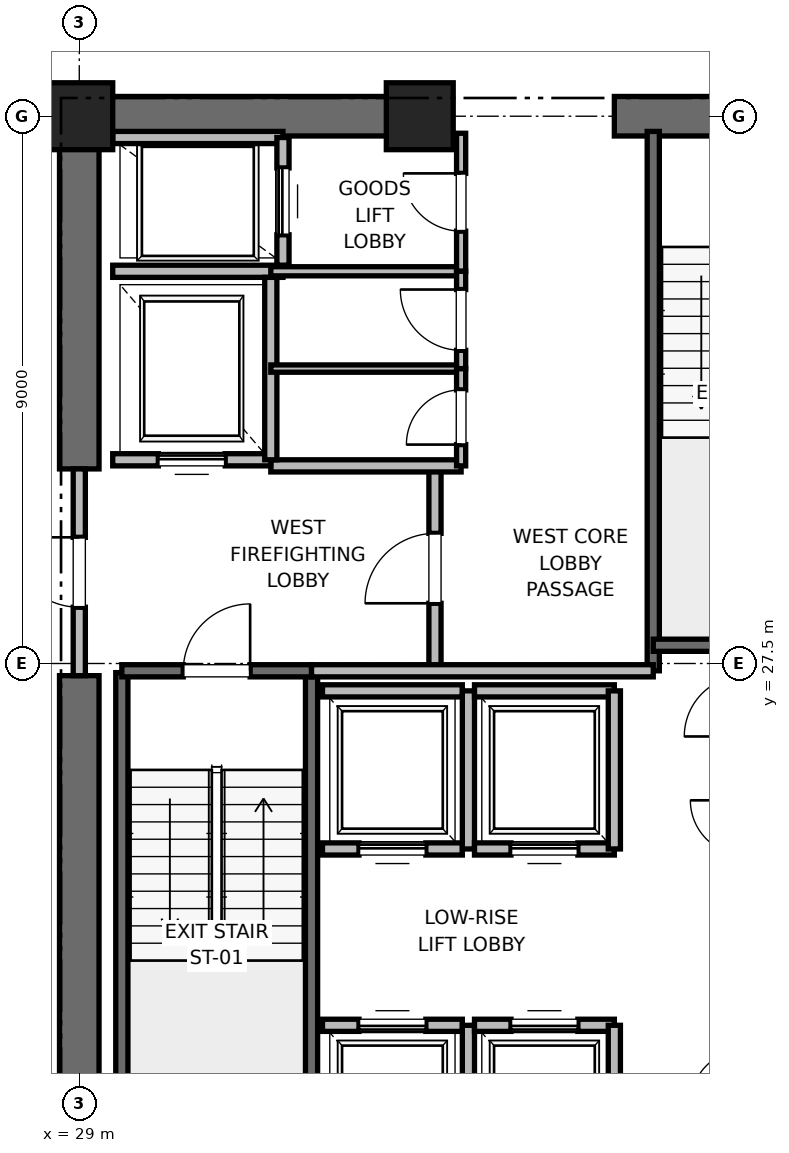
"""IFC4 building model, lengths in metres.
Left out: names, types, materials, properties, quantities, classifications, styles, units other than length and angle.
Written with IfcOpenShell. Run it as: python <this file> out.ifc"""

import sys

from ifc_helpers import new_model, si_unit, direction, frame, frame_2d, origin, origin_2d, place, context, subcontext, project, spatial, rectangle, extrude, element, fill, save


model = new_model("IFC4")
c1 = context("Model", 3, precision=1e-05, world=origin(), true_north=direction((0.0, 1.0)))
c2 = subcontext(c1, "Body", "Model", "MODEL_VIEW")
j1 = project(units=[si_unit("LENGTHUNIT", "METRE"), si_unit("PLANEANGLEUNIT", "RADIAN")], contexts=[c1])
p1 = place(None, origin())
s1 = spatial("IfcSite", under=j1, at=p1, CompositionType="ELEMENT")
p2 = place(p1, origin())
s2 = spatial("IfcBuilding", under=s1, at=p2, CompositionType="ELEMENT")
p3 = place(p2, frame((0.0, 0.0, 63.6)))
s3 = spatial("IfcBuildingStorey", under=s2, at=p3, CompositionType="ELEMENT", Elevation=63.6)
for number, where, z_axis, x_axis in (
    (1, (29.0, 36.5, 0.0), (0.0, 0.0, 1.0), (1.0, 0.0, 0.0)),
    (2, (34.6, 36.5, 0.0), (0.0, 0.0, 1.0), (1.0, 0.0, 0.0)),
):
    element("IfcColumn", number, at=place(p3, frame(where, z_axis=z_axis, x_axis=x_axis)), inside=s3, PredefinedType="PILASTER", context=c2, shape_type="SweptSolid", body=[
        extrude(rectangle(XDim=1.1, YDim=1.1, at=origin_2d()), origin(), (0.0, 0.0, 1.0), 4.0),
    ])
p4 = place(p3, frame((29.0, 36.5, 0.0), z_axis=(0.0, 0.0, 1.0), x_axis=(1.0, 0.0, 0.0)))
e3 = element("IfcWall", 3, at=p4, inside=s3, PredefinedType="SHEAR", context=c2, shape_type="SweptSolid", body=[
    extrude(rectangle(XDim=5.8, YDim=0.65, at=frame_2d((2.9, 0.0))), origin(), (0.0, 0.0, 1.0), 3.76),
])
p5 = place(p3, frame((37.8, 36.5, 0.0), z_axis=(0.0, 0.0, 1.0), x_axis=(1.0, 0.0, 0.0)))
e4 = element("IfcWall", 4, at=p5, inside=s3, PredefinedType="SHEAR", context=c2, shape_type="SweptSolid", body=[
    extrude(rectangle(XDim=4.4, YDim=0.65, at=frame_2d((2.2, 0.0))), origin(), (0.0, 0.0, 1.0), 3.76),
])
p6 = place(p5, frame((1.65, 0.0, 0.0)))
e5 = element("IfcOpeningElement", 5, at=p6, cuts=e4, PredefinedType="OPENING", context=c2, shape_type="SweptSolid", body=[
    extrude(rectangle(XDim=1.1, YDim=2.15, at=frame_2d((0.55, 1.075))), frame((0.0, 0.325, 0.0), z_axis=(0.0, -1.0, 0.0), x_axis=(1.0, 0.0, 0.0)), (0.0, 0.0, 1.0), 0.65),
])
p7 = place(p3, frame((29.0, 18.5, 0.0), z_axis=(0.0, 0.0, 1.0), x_axis=(0.0, 1.0, 0.0)))
e6 = element("IfcWall", 6, at=p7, inside=s3, PredefinedType="SHEAR", context=c2, shape_type="SweptSolid", body=[
    extrude(rectangle(XDim=8.8, YDim=0.65, at=frame_2d((4.4, 0.0))), origin(), (0.0, 0.0, 1.0), 3.76),
])
p8 = place(p3, frame((29.0, 30.7, 0.0), z_axis=(0.0, 0.0, 1.0), x_axis=(0.0, 1.0, 0.0)))
e7 = element("IfcWall", 7, at=p8, inside=s3, PredefinedType="SHEAR", context=c2, shape_type="SweptSolid", body=[
    extrude(rectangle(XDim=5.8, YDim=0.65, at=frame_2d((2.9, 0.0))), origin(), (0.0, 0.0, 1.0), 3.76),
])
p9 = place(p3, frame((29.7, 19.2, 0.0), z_axis=(0.0, 0.0, 1.0), x_axis=(0.0, 1.0, 0.0)))
e8 = element("IfcWall", 8, at=p9, inside=s3, PredefinedType="SOLIDWALL", context=c2, shape_type="SweptSolid", body=[
    extrude(rectangle(XDim=8.15, YDim=0.2, at=frame_2d((4.075, 0.0))), origin(), (0.0, 0.0, 1.0), 3.76),
])
p10 = place(p3, frame((32.82, 18.6, 0.0), z_axis=(0.0, 0.0, 1.0), x_axis=(0.0, 1.0, 0.0)))
e9 = element("IfcWall", 9, at=p10, inside=s3, PredefinedType="SOLIDWALL", context=c2, shape_type="SweptSolid", body=[
    extrude(rectangle(XDim=8.78, YDim=0.2, at=frame_2d((4.39, 0.0))), origin(), (0.0, 0.0, 1.0), 3.76),
])
p11 = place(p3, frame((29.7, 27.38, 0.0), z_axis=(0.0, 0.0, 1.0), x_axis=(1.0, 0.0, 0.0)))
e10 = element("IfcWall", 10, at=p11, inside=s3, PredefinedType="SOLIDWALL", context=c2, shape_type="SweptSolid", body=[
    extrude(rectangle(XDim=3.12, YDim=0.2, at=frame_2d((1.56, 0.0))), origin(), (0.0, 0.0, 1.0), 3.76),
])
p12 = place(p11, frame((1.01, 0.0, 0.0)))
e11 = element("IfcOpeningElement", 11, at=p12, cuts=e10, PredefinedType="OPENING", context=c2, shape_type="SweptSolid", body=[
    extrude(rectangle(XDim=1.1, YDim=2.15, at=frame_2d((0.55, 1.075))), frame((0.0, 0.1, 0.0), z_axis=(0.0, -1.0, 0.0), x_axis=(1.0, 0.0, 0.0)), (0.0, 0.0, 1.0), 0.2),
])
p13 = place(p3, frame((38.44, 27.38, 0.0), z_axis=(0.0, 0.0, 1.0), x_axis=(0.0, 1.0, 0.0)))
e12 = element("IfcWall", 12, at=p13, inside=s3, PredefinedType="SOLIDWALL", context=c2, shape_type="SweptSolid", body=[
    extrude(rectangle(XDim=8.87, YDim=0.2, at=frame_2d((4.435, 0.0))), origin(), (0.0, 0.0, 1.0), 3.76),
])
p14 = place(p3, frame((38.44, 27.8, 0.0), z_axis=(0.0, 0.0, 1.0), x_axis=(1.0, 0.0, 0.0)))
e13 = element("IfcWall", 13, at=p14, inside=s3, PredefinedType="SOLIDWALL", context=c2, shape_type="SweptSolid", body=[
    extrude(rectangle(XDim=3.32, YDim=0.2, at=frame_2d((1.66, 0.0))), origin(), (0.0, 0.0, 1.0), 3.76),
])
p15 = place(p3, frame((34.85, 27.38, 0.0), z_axis=(0.0, 0.0, 1.0), x_axis=(0.0, 1.0, 0.0)))
e14 = element("IfcWall", 14, at=p15, inside=s3, PredefinedType="PARTITIONING", context=c2, shape_type="SweptSolid", body=[
    extrude(rectangle(XDim=3.37, YDim=0.2, at=frame_2d((1.685, 0.0))), origin(), (0.0, 0.0, 1.0), 3.76),
])
p16 = place(p15, frame((1.11, 0.0, 0.0)))
e15 = element("IfcOpeningElement", 15, at=p16, cuts=e14, PredefinedType="OPENING", context=c2, shape_type="SweptSolid", body=[
    extrude(rectangle(XDim=1.15, YDim=2.2, at=frame_2d((0.575, 1.1))), frame((0.0, 0.1, 0.0), z_axis=(0.0, -1.0, 0.0), x_axis=(1.0, 0.0, 0.0)), (0.0, 0.0, 1.0), 0.2),
])
p17 = place(p3, frame((29.0, 27.3, 0.0), z_axis=(0.0, 0.0, 1.0), x_axis=(0.0, 1.0, 0.0)))
e16 = element("IfcWall", 16, at=p17, inside=s3, PredefinedType="PARTITIONING", context=c2, shape_type="SweptSolid", body=[
    extrude(rectangle(XDim=3.4, YDim=0.2, at=frame_2d((1.7, 0.0))), origin(), (0.0, 0.0, 1.0), 2.54),
])
p18 = place(p17, frame((1.125, 0.0, 0.0)))
e17 = element("IfcOpeningElement", 17, at=p18, cuts=e16, PredefinedType="OPENING", context=c2, shape_type="SweptSolid", body=[
    extrude(rectangle(XDim=1.15, YDim=2.2, at=frame_2d((0.575, 1.1))), frame((0.0, 0.1, 0.0), z_axis=(0.0, -1.0, 0.0), x_axis=(1.0, 0.0, 0.0)), (0.0, 0.0, 1.0), 0.2),
])
p19 = place(p3, frame((32.82, 27.38, 0.0), z_axis=(0.0, 0.0, 1.0), x_axis=(1.0, 0.0, 0.0)))
e18 = element("IfcWall", 18, at=p19, inside=s3, PredefinedType="PARTITIONING", context=c2, shape_type="SweptSolid", body=[
    extrude(rectangle(XDim=5.62, YDim=0.2, at=frame_2d((2.81, 0.0))), origin(), (0.0, 0.0, 1.0), 3.76),
])
p20 = place(p3, frame((32.15, 30.75, 0.0), z_axis=(0.0, 0.0, 1.0), x_axis=(1.0, 0.0, 0.0)))
e19 = element("IfcWall", 19, at=p20, inside=s3, PredefinedType="PARTITIONING", context=c2, shape_type="SweptSolid", body=[
    extrude(rectangle(XDim=3.13, YDim=0.2, at=frame_2d((1.565, 0.0))), origin(), (0.0, 0.0, 1.0), 3.76),
])
p21 = place(p3, frame((29.55, 30.85, 0.0), z_axis=(0.0, 0.0, 1.0), x_axis=(1.0, 0.0, 0.0)))
e20 = element("IfcWall", 20, at=p21, inside=s3, PredefinedType="SOLIDWALL", context=c2, shape_type="SweptSolid", body=[
    extrude(rectangle(XDim=2.6, YDim=0.2, at=frame_2d((1.3, 0.0))), origin(), (0.0, 0.0, 1.0), 2.54),
])
p22 = place(p21, frame((0.75, 0.0, 0.0)))
e21 = element("IfcOpeningElement", 21, at=p22, cuts=e20, PredefinedType="OPENING", context=c2, shape_type="SweptSolid", body=[
    extrude(rectangle(XDim=1.1, YDim=2.2, at=frame_2d((0.55, 1.1))), frame((0.0, 0.1, 0.0), z_axis=(0.0, -1.0, 0.0), x_axis=(1.0, 0.0, 0.0)), (0.0, 0.0, 1.0), 0.2),
])
p23 = place(p3, frame((29.55, 33.95, 0.0), z_axis=(0.0, 0.0, 1.0), x_axis=(1.0, 0.0, 0.0)))
e22 = element("IfcWall", 22, at=p23, inside=s3, PredefinedType="SOLIDWALL", context=c2, shape_type="SweptSolid", body=[
    extrude(rectangle(XDim=2.8, YDim=0.2, at=frame_2d((1.4, 0.0))), origin(), (0.0, 0.0, 1.0), 3.76),
])
p24 = place(p3, frame((32.15, 30.85, 0.0), z_axis=(0.0, 0.0, 1.0), x_axis=(0.0, 1.0, 0.0)))
e23 = element("IfcWall", 23, at=p24, inside=s3, PredefinedType="SOLIDWALL", context=c2, shape_type="SweptSolid", body=[
    extrude(rectangle(XDim=3.0, YDim=0.2, at=frame_2d((1.5, 0.0))), origin(), (0.0, 0.0, 1.0), 3.76),
])
p25 = place(p3, frame((32.35, 36.15, 0.0), z_axis=(0.0, 0.0, 1.0), x_axis=(-1.0, 0.0, 0.0)))
e24 = element("IfcWall", 24, at=p25, inside=s3, PredefinedType="SOLIDWALL", context=c2, shape_type="SweptSolid", body=[
    extrude(rectangle(XDim=2.8, YDim=0.2, at=frame_2d((1.4, 0.0))), origin(), (0.0, 0.0, 1.0), 2.889),
])
p26 = place(p3, frame((32.35, 34.05, 0.0), z_axis=(0.0, 0.0, 1.0), x_axis=(0.0, 1.0, 0.0)))
e25 = element("IfcWall", 25, at=p26, inside=s3, PredefinedType="SOLIDWALL", context=c2, shape_type="SweptSolid", body=[
    extrude(rectangle(XDim=2.1, YDim=0.2, at=frame_2d((1.05, 0.0))), origin(), (0.0, 0.0, 1.0), 3.76),
])
p27 = place(p26, frame((0.5, 0.0, 0.0)))
e26 = element("IfcOpeningElement", 26, at=p27, cuts=e25, PredefinedType="OPENING", context=c2, shape_type="SweptSolid", body=[
    extrude(rectangle(XDim=1.1, YDim=2.2, at=frame_2d((0.55, 1.1))), frame((0.0, 0.1, 0.0), z_axis=(0.0, -1.0, 0.0), x_axis=(1.0, 0.0, 0.0)), (0.0, 0.0, 1.0), 0.2),
])
p28 = place(p3, frame((35.3, 21.55, 0.0), z_axis=(0.0, 0.0, 1.0), x_axis=(-1.0, 0.0, 0.0)))
e27 = element("IfcWall", 27, at=p28, inside=s3, PredefinedType="SOLIDWALL", context=c2, shape_type="SweptSolid", body=[
    extrude(rectangle(XDim=2.3, YDim=0.2, at=frame_2d((1.15, 0.0))), origin(), (0.0, 0.0, 1.0), 3.76),
])
p29 = place(p28, frame((0.6, 0.0, 0.0)))
e28 = element("IfcOpeningElement", 28, at=p29, cuts=e27, PredefinedType="OPENING", context=c2, shape_type="SweptSolid", body=[
    extrude(rectangle(XDim=1.1, YDim=2.2, at=frame_2d((0.55, 1.1))), frame((0.0, 0.1, 0.0), z_axis=(0.0, -1.0, 0.0), x_axis=(1.0, 0.0, 0.0)), (0.0, 0.0, 1.0), 0.2),
])
p30 = place(p3, frame((35.4, 18.95, 0.0), z_axis=(0.0, 0.0, 1.0), x_axis=(0.0, 1.0, 0.0)))
e29 = element("IfcWall", 29, at=p30, inside=s3, PredefinedType="SOLIDWALL", context=c2, shape_type="SweptSolid", body=[
    extrude(rectangle(XDim=2.6, YDim=0.2, at=frame_2d((1.3, 0.0))), origin(), (0.0, 0.0, 1.0), 3.76),
])
p31 = place(p3, frame((37.8, 21.55, 0.0), z_axis=(0.0, 0.0, 1.0), x_axis=(-1.0, 0.0, 0.0)))
e30 = element("IfcWall", 30, at=p31, inside=s3, PredefinedType="SOLIDWALL", context=c2, shape_type="SweptSolid", body=[
    extrude(rectangle(XDim=2.3, YDim=0.2, at=frame_2d((1.15, 0.0))), origin(), (0.0, 0.0, 1.0), 3.76),
])
p32 = place(p31, frame((0.6, 0.0, 0.0)))
e31 = element("IfcOpeningElement", 31, at=p32, cuts=e30, PredefinedType="OPENING", context=c2, shape_type="SweptSolid", body=[
    extrude(rectangle(XDim=1.1, YDim=2.2, at=frame_2d((0.55, 1.1))), frame((0.0, 0.1, 0.0), z_axis=(0.0, -1.0, 0.0), x_axis=(1.0, 0.0, 0.0)), (0.0, 0.0, 1.0), 0.2),
])
p33 = place(p3, frame((37.8, 18.95, 0.0), z_axis=(0.0, 0.0, 1.0), x_axis=(0.0, 1.0, 0.0)))
e32 = element("IfcWall", 32, at=p33, inside=s3, PredefinedType="SOLIDWALL", context=c2, shape_type="SweptSolid", body=[
    extrude(rectangle(XDim=2.6, YDim=0.2, at=frame_2d((1.3, 0.0))), origin(), (0.0, 0.0, 1.0), 2.54),
])
p34 = place(p3, frame((33.0, 24.45, 0.0), z_axis=(0.0, 0.0, 1.0), x_axis=(1.0, 0.0, 0.0)))
e33 = element("IfcWall", 33, at=p34, inside=s3, PredefinedType="SOLIDWALL", context=c2, shape_type="SweptSolid", body=[
    extrude(rectangle(XDim=2.3, YDim=0.2, at=frame_2d((1.15, 0.0))), origin(), (0.0, 0.0, 1.0), 3.76),
])
p35 = place(p34, frame((0.6, 0.0, 0.0)))
e34 = element("IfcOpeningElement", 34, at=p35, cuts=e33, PredefinedType="OPENING", context=c2, shape_type="SweptSolid", body=[
    extrude(rectangle(XDim=1.1, YDim=2.2, at=frame_2d((0.55, 1.1))), frame((0.0, 0.1, 0.0), z_axis=(0.0, -1.0, 0.0), x_axis=(1.0, 0.0, 0.0)), (0.0, 0.0, 1.0), 0.2),
])
p36 = place(p3, frame((35.3, 27.05, 0.0), z_axis=(0.0, 0.0, 1.0), x_axis=(-1.0, 0.0, 0.0)))
e35 = element("IfcWall", 35, at=p36, inside=s3, PredefinedType="SOLIDWALL", context=c2, shape_type="SweptSolid", body=[
    extrude(rectangle(XDim=2.3, YDim=0.2, at=frame_2d((1.15, 0.0))), origin(), (0.0, 0.0, 1.0), 3.76),
])
p37 = place(p3, frame((35.4, 24.45, 0.0), z_axis=(0.0, 0.0, 1.0), x_axis=(0.0, 1.0, 0.0)))
e36 = element("IfcWall", 36, at=p37, inside=s3, PredefinedType="SOLIDWALL", context=c2, shape_type="SweptSolid", body=[
    extrude(rectangle(XDim=2.6, YDim=0.2, at=frame_2d((1.3, 0.0))), origin(), (0.0, 0.0, 1.0), 3.76),
])
p38 = place(p3, frame((35.5, 24.45, 0.0), z_axis=(0.0, 0.0, 1.0), x_axis=(1.0, 0.0, 0.0)))
e37 = element("IfcWall", 37, at=p38, inside=s3, PredefinedType="SOLIDWALL", context=c2, shape_type="SweptSolid", body=[
    extrude(rectangle(XDim=2.3, YDim=0.2, at=frame_2d((1.15, 0.0))), origin(), (0.0, 0.0, 1.0), 3.76),
])
p39 = place(p38, frame((0.6, 0.0, 0.0)))
e38 = element("IfcOpeningElement", 38, at=p39, cuts=e37, PredefinedType="OPENING", context=c2, shape_type="SweptSolid", body=[
    extrude(rectangle(XDim=1.1, YDim=2.2, at=frame_2d((0.55, 1.1))), frame((0.0, 0.1, 0.0), z_axis=(0.0, -1.0, 0.0), x_axis=(1.0, 0.0, 0.0)), (0.0, 0.0, 1.0), 0.2),
])
p40 = place(p3, frame((37.8, 27.05, 0.0), z_axis=(0.0, 0.0, 1.0), x_axis=(-1.0, 0.0, 0.0)))
e39 = element("IfcWall", 39, at=p40, inside=s3, PredefinedType="SOLIDWALL", context=c2, shape_type="SweptSolid", body=[
    extrude(rectangle(XDim=2.3, YDim=0.2, at=frame_2d((1.15, 0.0))), origin(), (0.0, 0.0, 1.0), 3.76),
])
p41 = place(p3, frame((37.8, 24.45, 0.0), z_axis=(0.0, 0.0, 1.0), x_axis=(0.0, 1.0, 0.0)))
e40 = element("IfcWall", 40, at=p41, inside=s3, PredefinedType="SOLIDWALL", context=c2, shape_type="SweptSolid", body=[
    extrude(rectangle(XDim=2.6, YDim=0.2, at=frame_2d((1.3, 0.0))), origin(), (0.0, 0.0, 1.0), 3.76),
])
p42 = place(p3, frame((32.15, 33.95, 0.0), z_axis=(0.0, 0.0, 1.0), x_axis=(1.0, 0.0, 0.0)))
e41 = element("IfcWall", 41, at=p42, inside=s3, PredefinedType="PARTITIONING", context=c2, shape_type="SweptSolid", body=[
    extrude(rectangle(XDim=3.13, YDim=0.15, at=frame_2d((1.565, 0.0))), origin(), (0.0, 0.0, 1.0), 2.85),
])
p43 = place(p3, frame((35.28, 33.95, 0.0), z_axis=(0.0, 0.0, 1.0), x_axis=(0.0, 1.0, 0.0)))
e42 = element("IfcWall", 42, at=p43, inside=s3, PredefinedType="PARTITIONING", context=c2, shape_type="SweptSolid", body=[
    extrude(rectangle(XDim=2.27, YDim=0.15, at=frame_2d((1.135, 0.0))), origin(), (0.0, 0.0, 1.0), 2.54),
])
p44 = place(p43, frame((0.66, 0.0, 0.0)))
e43 = element("IfcOpeningElement", 43, at=p44, cuts=e42, PredefinedType="OPENING", context=c2, shape_type="SweptSolid", body=[
    extrude(rectangle(XDim=0.95, YDim=2.15, at=frame_2d((0.475, 1.075))), frame((0.0, 0.075, 0.0), z_axis=(0.0, -1.0, 0.0), x_axis=(1.0, 0.0, 0.0)), (0.0, 0.0, 1.0), 0.15),
])
p45 = place(p3, frame((32.15, 32.35, 0.0), z_axis=(0.0, 0.0, 1.0), x_axis=(1.0, 0.0, 0.0)))
e44 = element("IfcWall", 44, at=p45, inside=s3, PredefinedType="PARTITIONING", context=c2, shape_type="SweptSolid", body=[
    extrude(rectangle(XDim=3.13, YDim=0.12, at=frame_2d((1.565, 0.0))), origin(), (0.0, 0.0, 1.0), 2.85),
])
p46 = place(p3, frame((35.28, 30.75, 0.0), z_axis=(0.0, 0.0, 1.0), x_axis=(0.0, 1.0, 0.0)))
e45 = element("IfcWall", 45, at=p46, inside=s3, PredefinedType="PARTITIONING", context=c2, shape_type="SweptSolid", body=[
    extrude(rectangle(XDim=1.6, YDim=0.15, at=frame_2d((0.8, 0.0))), origin(), (0.0, 0.0, 1.0), 2.85),
])
p47 = place(p46, frame((0.35, 0.0, 0.0)))
e46 = element("IfcOpeningElement", 46, at=p47, cuts=e45, PredefinedType="OPENING", context=c2, shape_type="SweptSolid", body=[
    extrude(rectangle(XDim=0.9, YDim=2.1, at=frame_2d((0.45, 1.05))), frame((0.0, 0.075, 0.0), z_axis=(0.0, -1.0, 0.0), x_axis=(1.0, 0.0, 0.0)), (0.0, 0.0, 1.0), 0.15),
])
p48 = place(p3, frame((35.28, 32.35, 0.0), z_axis=(0.0, 0.0, 1.0), x_axis=(0.0, 1.0, 0.0)))
e47 = element("IfcWall", 47, at=p48, inside=s3, PredefinedType="PARTITIONING", context=c2, shape_type="SweptSolid", body=[
    extrude(rectangle(XDim=1.6, YDim=0.15, at=frame_2d((0.8, 0.0))), origin(), (0.0, 0.0, 1.0), 2.85),
])
p49 = place(p48, frame((0.3, 0.0, 0.0)))
e48 = element("IfcOpeningElement", 48, at=p49, cuts=e47, PredefinedType="OPENING", context=c2, shape_type="SweptSolid", body=[
    extrude(rectangle(XDim=1.0, YDim=2.15, at=frame_2d((0.5, 1.075))), frame((0.0, 0.075, 0.0), z_axis=(0.0, -1.0, 0.0), x_axis=(1.0, 0.0, 0.0)), (0.0, 0.0, 1.0), 0.15),
])
p50 = place(p12, origin())
e49 = element("IfcDoor", 49, at=p50, inside=s3, OperationType="SINGLE_SWING_RIGHT", PredefinedType="DOOR", context=c2, shape_type="SweptSolid", body=[
    extrude(rectangle(XDim=1.1, YDim=2.15, at=frame_2d((0.55, 1.075))), frame((0.0, 0.025, 0.0), z_axis=(0.0, -1.0, 0.0), x_axis=(1.0, 0.0, 0.0)), (0.0, 0.0, 1.0), 0.05),
])
fill(e11, e49)
p51 = place(p16, origin())
e50 = element("IfcDoor", 50, at=p51, inside=s3, OperationType="SINGLE_SWING_LEFT", PredefinedType="DOOR", context=c2, shape_type="SweptSolid", body=[
    extrude(rectangle(XDim=1.15, YDim=2.2, at=frame_2d((0.575, 1.1))), frame((0.0, 0.025, 0.0), z_axis=(0.0, -1.0, 0.0), x_axis=(1.0, 0.0, 0.0)), (0.0, 0.0, 1.0), 0.05),
])
fill(e15, e50)
p52 = place(p18, origin())
e51 = element("IfcDoor", 51, at=p52, inside=s3, OperationType="SINGLE_SWING_RIGHT", PredefinedType="DOOR", context=c2, shape_type="SweptSolid", body=[
    extrude(rectangle(XDim=1.15, YDim=2.2, at=frame_2d((0.575, 1.1))), frame((0.0, 0.025, 0.0), z_axis=(0.0, -1.0, 0.0), x_axis=(1.0, 0.0, 0.0)), (0.0, 0.0, 1.0), 0.05),
])
fill(e17, e51)
p53 = place(p22, origin())
e52 = element("IfcDoor", 52, at=p53, inside=s3, OperationType="SLIDING_TO_RIGHT", PredefinedType="DOOR", context=c2, shape_type="SweptSolid", body=[
    extrude(rectangle(XDim=1.1, YDim=2.2, at=frame_2d((0.55, 1.1))), frame((0.0, 0.025, 0.0), z_axis=(0.0, -1.0, 0.0), x_axis=(1.0, 0.0, 0.0)), (0.0, 0.0, 1.0), 0.05),
])
fill(e21, e52)
p54 = place(p27, origin())
e53 = element("IfcDoor", 53, at=p54, inside=s3, OperationType="SLIDING_TO_RIGHT", PredefinedType="DOOR", context=c2, shape_type="SweptSolid", body=[
    extrude(rectangle(XDim=1.1, YDim=2.2, at=frame_2d((0.55, 1.1))), frame((0.0, 0.025, 0.0), z_axis=(0.0, -1.0, 0.0), x_axis=(1.0, 0.0, 0.0)), (0.0, 0.0, 1.0), 0.05),
])
fill(e26, e53)
p55 = place(p29, origin())
e54 = element("IfcDoor", 54, at=p55, inside=s3, OperationType="SLIDING_TO_RIGHT", PredefinedType="DOOR", context=c2, shape_type="SweptSolid", body=[
    extrude(rectangle(XDim=1.1, YDim=2.2, at=frame_2d((0.55, 1.1))), frame((0.0, 0.025, 0.0), z_axis=(0.0, -1.0, 0.0), x_axis=(1.0, 0.0, 0.0)), (0.0, 0.0, 1.0), 0.05),
])
fill(e28, e54)
p56 = place(p32, origin())
e55 = element("IfcDoor", 55, at=p56, inside=s3, OperationType="SLIDING_TO_RIGHT", PredefinedType="DOOR", context=c2, shape_type="SweptSolid", body=[
    extrude(rectangle(XDim=1.1, YDim=2.2, at=frame_2d((0.55, 1.1))), frame((0.0, 0.025, 0.0), z_axis=(0.0, -1.0, 0.0), x_axis=(1.0, 0.0, 0.0)), (0.0, 0.0, 1.0), 0.05),
])
fill(e31, e55)
p57 = place(p35, origin())
e56 = element("IfcDoor", 56, at=p57, inside=s3, OperationType="SLIDING_TO_RIGHT", PredefinedType="DOOR", context=c2, shape_type="SweptSolid", body=[
    extrude(rectangle(XDim=1.1, YDim=2.2, at=frame_2d((0.55, 1.1))), frame((0.0, 0.025, 0.0), z_axis=(0.0, -1.0, 0.0), x_axis=(1.0, 0.0, 0.0)), (0.0, 0.0, 1.0), 0.05),
])
fill(e34, e56)
p58 = place(p39, origin())
e57 = element("IfcDoor", 57, at=p58, inside=s3, OperationType="SLIDING_TO_RIGHT", PredefinedType="DOOR", context=c2, shape_type="SweptSolid", body=[
    extrude(rectangle(XDim=1.1, YDim=2.2, at=frame_2d((0.55, 1.1))), frame((0.0, 0.025, 0.0), z_axis=(0.0, -1.0, 0.0), x_axis=(1.0, 0.0, 0.0)), (0.0, 0.0, 1.0), 0.05),
])
fill(e38, e57)
p59 = place(p44, origin())
e58 = element("IfcDoor", 58, at=p59, inside=s3, OperationType="SINGLE_SWING_RIGHT", PredefinedType="DOOR", context=c2, shape_type="SweptSolid", body=[
    extrude(rectangle(XDim=0.95, YDim=2.15, at=frame_2d((0.475, 1.075))), frame((0.0, 0.025, 0.0), z_axis=(0.0, -1.0, 0.0), x_axis=(1.0, 0.0, 0.0)), (0.0, 0.0, 1.0), 0.05),
])
fill(e43, e58)
p60 = place(p47, origin())
e59 = element("IfcDoor", 59, at=p60, inside=s3, OperationType="SINGLE_SWING_LEFT", PredefinedType="DOOR", context=c2, shape_type="SweptSolid", body=[
    extrude(rectangle(XDim=0.9, YDim=2.1, at=frame_2d((0.45, 1.05))), frame((0.0, 0.025, 0.0), z_axis=(0.0, -1.0, 0.0), x_axis=(1.0, 0.0, 0.0)), (0.0, 0.0, 1.0), 0.05),
])
fill(e46, e59)
p61 = place(p49, origin())
e60 = element("IfcDoor", 60, at=p61, inside=s3, OperationType="SINGLE_SWING_RIGHT", PredefinedType="DOOR", context=c2, shape_type="SweptSolid", body=[
    extrude(rectangle(XDim=1.0, YDim=2.15, at=frame_2d((0.5, 1.075))), frame((0.0, 0.025, 0.0), z_axis=(0.0, -1.0, 0.0), x_axis=(1.0, 0.0, 0.0)), (0.0, 0.0, 1.0), 0.05),
])
fill(e48, e60)
save(model, sys.argv[1])
